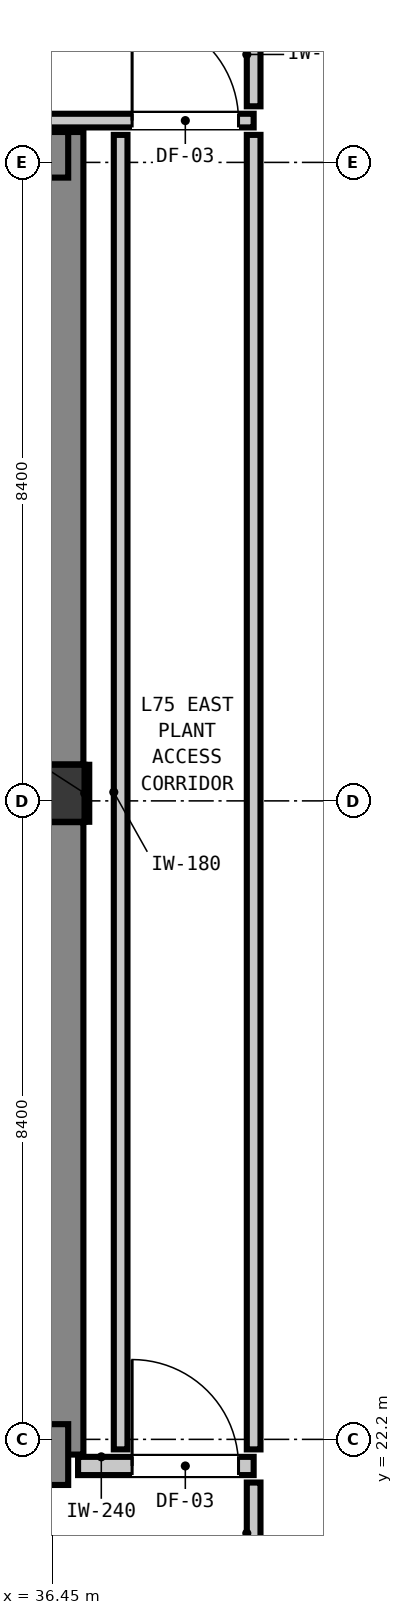
"""IFC4 building model, lengths in metres.
Left out: names, types, materials, properties, quantities, classifications, styles, units other than length and angle.
Written with IfcOpenShell. Run it as: python <this file> out.ifc"""

import sys

from ifc_helpers import new_model, si_unit, direction, frame, frame_2d, origin, origin_2d, place, context, subcontext, project, spatial, rectangle, extrude, element, fill, save


model = new_model("IFC4")
c1 = context("Model", 3, precision=1e-05, world=origin(), true_north=direction((0.0, 1.0)))
c2 = subcontext(c1, "Body", "Model", "MODEL_VIEW")
j1 = project(units=[si_unit("LENGTHUNIT", "METRE"), si_unit("PLANEANGLEUNIT", "RADIAN")], contexts=[c1])
p1 = place(None, origin())
s1 = spatial("IfcSite", under=j1, at=p1, CompositionType="ELEMENT")
p2 = place(p1, origin())
s2 = spatial("IfcBuilding", under=s1, at=p2, CompositionType="ELEMENT")
p3 = place(p2, frame((0.0, 0.0, 257.84)))
s3 = spatial("IfcBuildingStorey", under=s2, at=p3, CompositionType="ELEMENT", Elevation=257.84)
p4 = place(p3, frame((36.5, 30.7, 0.0), z_axis=(0.0, 0.0, 1.0), x_axis=(1.0, 0.0, 0.0)))
e1 = element("IfcColumn", 1, at=p4, inside=s3, PredefinedType="COLUMN", context=c2, shape_type="SweptSolid", body=[
    extrude(rectangle(XDim=0.75, YDim=0.75, at=origin_2d()), origin(), (0.0, 0.0, 1.0), 4.4),
])
p5 = place(p3, frame((36.46, 22.0, 0.0), z_axis=(0.0, 0.0, 1.0), x_axis=(0.0, 1.0, 0.0)))
e2 = element("IfcWall", 2, at=p5, inside=s3, PredefinedType="SHEAR", context=c2, shape_type="SweptSolid", body=[
    extrude(rectangle(XDim=8.32, YDim=0.8, at=frame_2d((4.16, 0.0))), origin(), (0.0, 0.0, 1.0), 4.4),
])
p6 = place(p3, frame((36.46, 31.08, 0.0), z_axis=(0.0, 0.0, 1.0), x_axis=(0.0, 1.0, 0.0)))
e3 = element("IfcWall", 3, at=p6, inside=s3, PredefinedType="SHEAR", context=c2, shape_type="SweptSolid", body=[
    extrude(rectangle(XDim=8.32, YDim=0.8, at=frame_2d((4.16, 0.0))), origin(), (0.0, 0.0, 1.0), 4.4),
])
p7 = place(p3, frame((29.58, 22.0, 0.0), z_axis=(0.0, 0.0, 1.0), x_axis=(1.0, 0.0, 0.0)))
e4 = element("IfcWall", 4, at=p7, inside=s3, PredefinedType="SHEAR", context=c2, shape_type="SweptSolid", body=[
    extrude(rectangle(XDim=7.08, YDim=0.8, at=frame_2d((3.54, 0.0))), origin(), (0.0, 0.0, 1.0), 4.4),
])
p8 = place(p3, frame((32.58, 39.1, 0.0), z_axis=(0.0, 0.0, 1.0), x_axis=(1.0, 0.0, 0.0)))
e5 = element("IfcWall", 5, at=p8, inside=s3, PredefinedType="SHEAR", context=c2, shape_type="SweptSolid", body=[
    extrude(rectangle(XDim=4.08, YDim=0.6, at=frame_2d((2.04, 0.0))), origin(), (0.0, 0.0, 1.0), 4.4),
])
p9 = place(p3, frame((36.79, 21.85, 0.0), z_axis=(0.0, 0.0, 1.0), x_axis=(1.0, 0.0, 0.0)))
e6 = element("IfcWall", 6, at=p9, inside=s3, PredefinedType="PARTITIONING", context=c2, shape_type="SweptSolid", body=[
    extrude(rectangle(XDim=2.31, YDim=0.24, at=frame_2d((1.155, 0.0))), origin(), (0.0, 0.0, 1.0), 3.807),
])
p10 = place(p9, frame((0.711, 0.0, 0.0)))
e7 = element("IfcOpeningElement", 7, at=p10, cuts=e6, PredefinedType="OPENING", context=c2, shape_type="SweptSolid", body=[
    extrude(rectangle(XDim=1.4, YDim=2.15, at=frame_2d((0.7, 1.075))), frame((0.0, 0.13, 0.0), z_axis=(0.0, -1.0, 0.0), x_axis=(1.0, 0.0, 0.0)), (0.0, 0.0, 1.0), 0.26),
])
p11 = place(p3, frame((29.677, 39.55, 0.0), z_axis=(0.0, 0.0, 1.0), x_axis=(1.0, 0.0, 0.0)))
e8 = element("IfcWall", 8, at=p11, inside=s3, PredefinedType="PARTITIONING", context=c2, shape_type="SweptSolid", body=[
    extrude(rectangle(XDim=9.423, YDim=0.18, at=frame_2d((4.711, 0.0))), origin(), (0.0, 0.0, 1.0), 3.807),
])
p12 = place(p11, frame((7.824, 0.0, 0.0)))
e9 = element("IfcOpeningElement", 9, at=p12, cuts=e8, PredefinedType="OPENING", context=c2, shape_type="SweptSolid", body=[
    extrude(rectangle(XDim=1.4, YDim=2.15, at=frame_2d((0.7, 1.075))), frame((0.0, 0.1, 0.0), z_axis=(0.0, -1.0, 0.0), x_axis=(1.0, 0.0, 0.0)), (0.0, 0.0, 1.0), 0.2),
])
p13 = place(p3, frame((37.35, 22.068, 0.0), z_axis=(0.0, 0.0, 1.0), x_axis=(0.0, 1.0, 0.0)))
e10 = element("IfcWall", 10, at=p13, inside=s3, PredefinedType="PARTITIONING", context=c2, shape_type="SweptSolid", body=[
    extrude(rectangle(XDim=17.294, YDim=0.18, at=frame_2d((8.647, 0.0))), origin(), (0.0, 0.0, 1.0), 4.18),
])
p14 = place(p3, frame((39.1, 20.298, 0.0), z_axis=(0.0, 0.0, 1.0), x_axis=(0.0, 1.0, 0.0)))
e11 = element("IfcWall", 11, at=p14, inside=s3, PredefinedType="PARTITIONING", context=c2, shape_type="SweptSolid", body=[
    extrude(rectangle(XDim=1.334, YDim=0.18, at=frame_2d((0.667, 0.0))), origin(), (0.0, 0.0, 1.0), 4.18),
])
p15 = place(p3, frame((39.1, 22.068, 0.0), z_axis=(0.0, 0.0, 1.0), x_axis=(0.0, 1.0, 0.0)))
e12 = element("IfcWall", 12, at=p15, inside=s3, PredefinedType="PARTITIONING", context=c2, shape_type="SweptSolid", body=[
    extrude(rectangle(XDim=17.294, YDim=0.18, at=frame_2d((8.647, 0.0))), origin(), (0.0, 0.0, 1.0), 4.18),
])
p16 = place(p3, frame((39.1, 39.738, 0.0), z_axis=(0.0, 0.0, 1.0), x_axis=(0.0, 1.0, 0.0)))
e13 = element("IfcWall", 13, at=p16, inside=s3, PredefinedType="PARTITIONING", context=c2, shape_type="SweptSolid", body=[
    extrude(rectangle(XDim=1.364, YDim=0.18, at=frame_2d((0.682, 0.0))), origin(), (0.0, 0.0, 1.0), 4.18),
])
p17 = place(p3, frame((36.907, 30.325, 0.0), z_axis=(0.0, 0.0, 1.0), x_axis=(0.0, 1.0, 0.0)))
e14 = element("IfcWall", 14, at=p17, inside=s3, PredefinedType="PARTITIONING", context=c2, shape_type="SweptSolid", body=[
    extrude(rectangle(XDim=0.75, YDim=0.06, at=frame_2d((0.375, 0.0))), origin(), (0.0, 0.0, 1.0), 1.45),
])
p18 = place(p10, origin())
e15 = element("IfcDoor", 15, at=p18, inside=s3, OperationType="SINGLE_SWING_LEFT", PredefinedType="DOOR", context=c2, shape_type="SweptSolid", body=[
    extrude(rectangle(XDim=1.4, YDim=2.15, at=frame_2d((0.7, 1.075))), frame((0.0, 0.025, 0.0), z_axis=(0.0, -1.0, 0.0), x_axis=(1.0, 0.0, 0.0)), (0.0, 0.0, 1.0), 0.05),
])
fill(e7, e15)
p19 = place(p12, origin())
e16 = element("IfcDoor", 16, at=p19, inside=s3, OperationType="SINGLE_SWING_LEFT", PredefinedType="DOOR", context=c2, shape_type="SweptSolid", body=[
    extrude(rectangle(XDim=1.4, YDim=2.15, at=frame_2d((0.7, 1.075))), frame((0.0, 0.025, 0.0), z_axis=(0.0, -1.0, 0.0), x_axis=(1.0, 0.0, 0.0)), (0.0, 0.0, 1.0), 0.05),
])
fill(e9, e16)
save(model, sys.argv[1])
